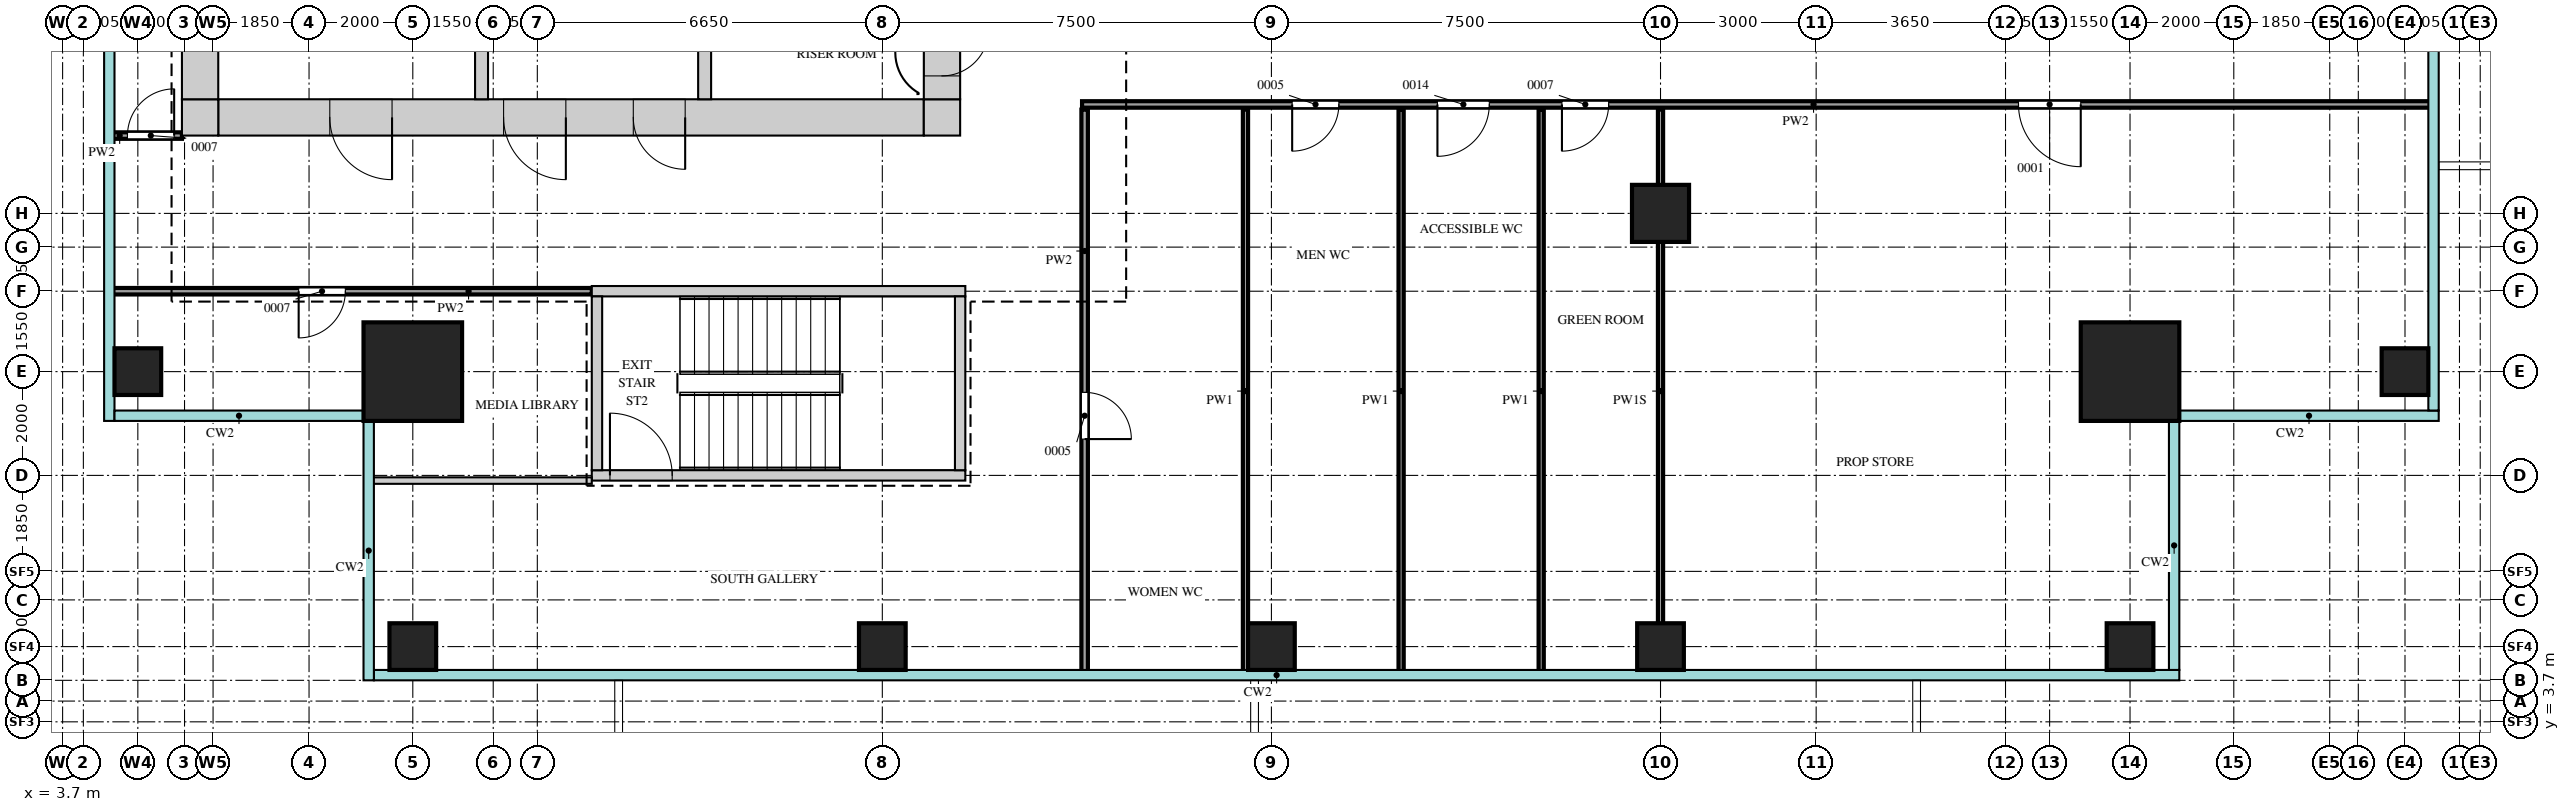
"""IFC4 building model, lengths in metres.
Left out: names, types, materials, properties, quantities, classifications, styles, units other than length and angle.
Written with IfcOpenShell. Run it as: python <this file> out.ifc"""

import sys

from ifc_helpers import new_model, si_unit, direction, frame, frame_2d, origin, origin_2d, place, context, subcontext, project, spatial, rectangle, extrude, source, transform, mapped, element, fill, save


model = new_model("IFC4")
c1 = context("Model", 3, precision=1e-05, world=origin(), true_north=direction((0.0, 1.0)))
c2 = subcontext(c1, "Body", "Model", "MODEL_VIEW")
j1 = project(units=[si_unit("LENGTHUNIT", "METRE"), si_unit("PLANEANGLEUNIT", "RADIAN")], contexts=[c1])
p1 = place(None, origin())
s1 = spatial("IfcSite", under=j1, at=p1, CompositionType="ELEMENT")
p2 = place(p1, origin())
s2 = spatial("IfcBuilding", under=s1, at=p2, CompositionType="ELEMENT")
p3 = place(p2, frame((0.0, 0.0, 250.2)))
s3 = spatial("IfcBuildingStorey", under=s2, at=p3, CompositionType="ELEMENT", Elevation=250.2)
m1 = source(origin(), c2, "Body", "SweptSolid", [
    extrude(rectangle(XDim=13.6, YDim=0.7, at=frame_2d((6.8, 0.0))), origin(), (0.0, 0.0, 1.0), 3.75),
])
p4 = place(p3, frame((6.7, 15.35, 0.0), z_axis=(0.0, 0.0, 1.0), x_axis=(1.0, 0.0, 0.0)))
e1 = element("IfcWall", 1, at=p4, inside=s3, PredefinedType="SHEAR", context=c2, shape_type="MappedRepresentation", body=[
    mapped(m1, transform((0.0, 0.0, 0.0))),
])
m2 = source(origin(), c2, "Body", "SweptSolid", [
    extrude(rectangle(XDim=1.2, YDim=2.1, at=frame_2d((0.6, 1.05))), frame((0.0, 0.36, 0.0), z_axis=(0.0, -1.0, 0.0), x_axis=(1.0, 0.0, 0.0)), (0.0, 0.0, 1.0), 0.72),
])
p5 = place(p4, frame((5.5, 0.0, 0.0)))
e2 = element("IfcOpeningElement", 2, at=p5, cuts=e1, PredefinedType="OPENING", context=c2, shape_type="MappedRepresentation", body=[
    mapped(m2, transform((0.0, 0.0, 0.0))),
])
p6 = place(p4, frame((2.15, 0.0, 0.0)))
e3 = element("IfcOpeningElement", 3, at=p6, cuts=e1, PredefinedType="OPENING", context=c2, shape_type="MappedRepresentation", body=[
    mapped(m2, transform((0.0, 0.0, 0.0))),
])
m3 = source(origin(), c2, "Body", "SweptSolid", [
    extrude(rectangle(XDim=1.0, YDim=2.1, at=frame_2d((0.5, 1.05))), frame((0.0, 0.36, 0.0), z_axis=(0.0, -1.0, 0.0), x_axis=(1.0, 0.0, 0.0)), (0.0, 0.0, 1.0), 0.72),
])
p7 = place(p4, frame((8.0, 0.0, 0.0)))
e4 = element("IfcOpeningElement", 4, at=p7, cuts=e1, PredefinedType="OPENING", context=c2, shape_type="MappedRepresentation", body=[
    mapped(m3, transform((0.0, 0.0, 0.0))),
])
m4 = source(origin(), c2, "Body", "SweptSolid", [
    extrude(rectangle(XDim=0.7, YDim=0.7, at=frame_2d((0.35, 0.0))), origin(), (0.0, 0.0, 1.0), 3.75),
])
for number, where, z_axis, x_axis in (
    (5, (20.3, 15.35, 0.0), (0.0, 0.0, 1.0), (1.0, 0.0, 0.0)),
    (6, (6.0, 15.35, 0.0), (0.0, 0.0, 1.0), (1.0, 0.0, 0.0)),
):
    element("IfcWall", number, at=place(p3, frame(where, z_axis=z_axis, x_axis=x_axis)), inside=s3, PredefinedType="SHEAR", context=c2, shape_type="MappedRepresentation", body=[
        mapped(m4, transform((0.0, 0.0, 0.0))),
    ])
m5 = source(origin(), c2, "Body", "SweptSolid", [
    extrude(rectangle(XDim=22.6, YDim=0.7, at=frame_2d((11.3, 0.0))), origin(), (0.0, 0.0, 1.0), 3.75),
])
p8 = place(p3, frame((20.65, 15.7, 0.0), z_axis=(0.0, 0.0, 1.0), x_axis=(0.0, 1.0, 0.0)))
e7 = element("IfcWall", 7, at=p8, inside=s3, PredefinedType="SHEAR", context=c2, shape_type="MappedRepresentation", body=[
    mapped(m5, transform((0.0, 0.0, 0.0))),
])
m6 = source(origin(), c2, "Body", "SweptSolid", [
    extrude(rectangle(XDim=1.8, YDim=2.1, at=frame_2d((0.9, 1.05))), frame((0.0, 0.36, 0.0), z_axis=(0.0, -1.0, 0.0), x_axis=(1.0, 0.0, 0.0)), (0.0, 0.0, 1.0), 0.72),
])
p9 = place(p8, frame((10.8, 0.0, 0.0)))
e8 = element("IfcOpeningElement", 8, at=p9, cuts=e7, PredefinedType="OPENING", context=c2, shape_type="MappedRepresentation", body=[
    mapped(m6, transform((0.0, 0.0, 0.0))),
])
m7 = source(origin(), c2, "Body", "SweptSolid", [
    extrude(rectangle(XDim=0.9, YDim=2.1, at=frame_2d((0.45, 1.05))), frame((0.0, 0.36, 0.0), z_axis=(0.0, -1.0, 0.0), x_axis=(1.0, 0.0, 0.0)), (0.0, 0.0, 1.0), 0.72),
])
p10 = place(p8, frame((0.45, 0.0, 0.0)))
e9 = element("IfcOpeningElement", 9, at=p10, cuts=e7, PredefinedType="OPENING", context=c2, shape_type="MappedRepresentation", body=[
    mapped(m7, transform((0.0, 0.0, 0.0))),
])
p11 = place(p8, frame((2.9, 0.0, 0.0)))
e10 = element("IfcOpeningElement", 10, at=p11, cuts=e7, PredefinedType="OPENING", context=c2, shape_type="MappedRepresentation", body=[
    mapped(m7, transform((0.0, 0.0, 0.0))),
])
p12 = place(p8, frame((5.65, 0.0, 0.0)))
e11 = element("IfcOpeningElement", 11, at=p12, cuts=e7, PredefinedType="OPENING", context=c2, shape_type="MappedRepresentation", body=[
    mapped(m7, transform((0.0, 0.0, 0.0))),
])
p13 = place(p3, frame((6.35, 15.7, 0.0), z_axis=(0.0, 0.0, 1.0), x_axis=(0.0, 1.0, 0.0)))
e12 = element("IfcWall", 12, at=p13, inside=s3, PredefinedType="SHEAR", context=c2, shape_type="MappedRepresentation", body=[
    mapped(m5, transform((0.0, 0.0, 0.0))),
])
m8 = source(origin(), c2, "Body", "SweptSolid", [
    extrude(rectangle(XDim=7.2, YDim=0.2, at=frame_2d((3.6, 0.0))), origin(), (0.0, 0.0, 1.0), 3.75),
])
p14 = place(p3, frame((13.9, 12.0, 0.0), z_axis=(0.0, 0.0, 1.0), x_axis=(1.0, 0.0, 0.0)))
e13 = element("IfcWall", 13, at=p14, inside=s3, PredefinedType="SHEAR", context=c2, shape_type="MappedRepresentation", body=[
    mapped(m8, transform((0.0, 0.0, 0.0))),
])
p15 = place(p3, frame((13.9, 8.45, 0.0), z_axis=(0.0, 0.0, 1.0), x_axis=(1.0, 0.0, 0.0)))
e14 = element("IfcWall", 14, at=p15, inside=s3, PredefinedType="SHEAR", context=c2, shape_type="MappedRepresentation", body=[
    mapped(m8, transform((0.0, 0.0, 0.0))),
])
m9 = source(origin(), c2, "Body", "SweptSolid", [
    extrude(rectangle(XDim=1.2, YDim=2.1, at=frame_2d((0.6, 1.05))), frame((0.0, 0.11, 0.0), z_axis=(0.0, -1.0, 0.0), x_axis=(1.0, 0.0, 0.0)), (0.0, 0.0, 1.0), 0.22),
])
p16 = place(p15, frame((0.35, 0.0, 0.0)))
e15 = element("IfcOpeningElement", 15, at=p16, cuts=e14, PredefinedType="OPENING", context=c2, shape_type="MappedRepresentation", body=[
    mapped(m9, transform((0.0, 0.0, 0.0))),
])
m10 = source(origin(), c2, "Body", "SweptSolid", [
    extrude(rectangle(XDim=3.35, YDim=0.2, at=frame_2d((1.675, 0.0))), origin(), (0.0, 0.0, 1.0), 3.75),
])
for number, where, z_axis, x_axis in (
    (16, (21.0, 8.55, 0.0), (0.0, 0.0, 1.0), (0.0, 1.0, 0.0)),
    (17, (14.0, 8.55, 0.0), (0.0, 0.0, 1.0), (0.0, 1.0, 0.0)),
):
    element("IfcWall", number, at=place(p3, frame(where, z_axis=z_axis, x_axis=x_axis)), inside=s3, PredefinedType="SHEAR", context=c2, shape_type="MappedRepresentation", body=[
        mapped(m10, transform((0.0, 0.0, 0.0))),
    ])
m11 = source(origin(), c2, "Body", "SweptSolid", [
    extrude(rectangle(XDim=3.5, YDim=0.25, at=frame_2d((1.75, 0.0))), origin(), (0.0, 0.0, 1.0), 3.75),
])
for number, where, z_axis, x_axis in (
    (18, (16.075, 15.7, 0.0), (0.0, 0.0, 1.0), (0.0, 1.0, 0.0)),
    (19, (11.775, 15.7, 0.0), (0.0, 0.0, 1.0), (0.0, 1.0, 0.0)),
):
    element("IfcWall", number, at=place(p3, frame(where, z_axis=z_axis, x_axis=x_axis)), inside=s3, PredefinedType="STANDARD", context=c2, shape_type="MappedRepresentation", body=[
        mapped(m11, transform((0.0, 0.0, 0.0))),
    ])
m12 = source(origin(), c2, "Body", "SweptSolid", [
    extrude(rectangle(XDim=1.9, YDim=1.9, at=origin_2d()), origin(), (0.0, 0.0, 1.0), 4.0),
])
for number, where, z_axis, x_axis in (
    (20, (43.55, 10.45, 0.0), (0.0, 0.0, 1.0), (1.0, 0.0, 0.0)),
    (21, (10.45, 10.45, 0.0), (0.0, 0.0, 1.0), (1.0, 0.0, 0.0)),
):
    element("IfcColumn", number, at=place(p3, frame(where, z_axis=z_axis, x_axis=x_axis)), inside=s3, PredefinedType="COLUMN", context=c2, shape_type="MappedRepresentation", body=[
        mapped(m12, transform((0.0, 0.0, 0.0))),
    ])
m13 = source(origin(), c2, "Body", "SweptSolid", [
    extrude(rectangle(XDim=0.9, YDim=0.9, at=origin_2d()), origin(), (0.0, 0.0, 1.0), 3.75),
])
for number, where, z_axis, x_axis in (
    (22, (10.45, 5.15, 0.0), (0.0, 0.0, 1.0), (1.0, 0.0, 0.0)),
    (23, (19.5, 5.15, 0.0), (0.0, 0.0, 1.0), (1.0, 0.0, 0.0)),
    (24, (27.0, 5.15, 0.0), (0.0, 0.0, 1.0), (1.0, 0.0, 0.0)),
    (25, (34.5, 5.15, 0.0), (0.0, 0.0, 1.0), (1.0, 0.0, 0.0)),
    (26, (43.55, 5.15, 0.0), (0.0, 0.0, 1.0), (1.0, 0.0, 0.0)),
    (27, (48.85, 10.45, 0.0), (0.0, 0.0, 1.0), (1.0, 0.0, 0.0)),
    (28, (5.15, 10.45, 0.0), (0.0, 0.0, 1.0), (1.0, 0.0, 0.0)),
):
    element("IfcColumn", number, at=place(p3, frame(where, z_axis=z_axis, x_axis=x_axis)), inside=s3, PredefinedType="COLUMN", context=c2, shape_type="MappedRepresentation", body=[
        mapped(m13, transform((0.0, 0.0, 0.0))),
    ])
m14 = source(origin(), c2, "Body", "SweptSolid", [
    extrude(rectangle(XDim=1.1, YDim=1.1, at=origin_2d()), origin(), (0.0, 0.0, 1.0), 3.75),
])
p17 = place(p3, frame((34.5, 13.5, 0.0), z_axis=(0.0, 0.0, 1.0), x_axis=(1.0, 0.0, 0.0)))
e29 = element("IfcColumn", 29, at=p17, inside=s3, PredefinedType="COLUMN", context=c2, shape_type="MappedRepresentation", body=[
    mapped(m14, transform((0.0, 0.0, 0.0))),
])
m15 = source(origin(), c2, "Body", "SweptSolid", [
    extrude(rectangle(XDim=10.85, YDim=0.125, at=frame_2d((5.425, 0.0))), origin(), (0.0, 0.0, 1.0), 3.8),
])
p18 = place(p3, frame((23.4, 4.65, 0.0), z_axis=(0.0, 0.0, 1.0), x_axis=(0.0, 1.0, 0.0)))
e30 = element("IfcWall", 30, at=p18, inside=s3, PredefinedType="PARTITIONING", context=c2, shape_type="MappedRepresentation", body=[
    mapped(m15, transform((0.0, 0.0, 0.0))),
])
m16 = source(origin(), c2, "Body", "SweptSolid", [
    extrude(rectangle(XDim=0.9, YDim=2.1, at=frame_2d((0.45, 1.05))), frame((0.0, 0.073, 0.0), z_axis=(0.0, -1.0, 0.0), x_axis=(1.0, 0.0, 0.0)), (0.0, 0.0, 1.0), 0.145),
])
p19 = place(p18, frame((4.5, 0.0, 0.0)))
e31 = element("IfcOpeningElement", 31, at=p19, cuts=e30, PredefinedType="OPENING", context=c2, shape_type="MappedRepresentation", body=[
    mapped(m16, transform((0.0, 0.0, 0.0))),
])
m17 = source(origin(), c2, "Body", "SweptSolid", [
    extrude(rectangle(XDim=10.85, YDim=0.1, at=frame_2d((5.425, 0.0))), origin(), (0.0, 0.0, 1.0), 3.8),
])
for number, where, z_axis, x_axis in (
    (32, (26.5, 4.65, 0.0), (0.0, 0.0, 1.0), (0.0, 1.0, 0.0)),
    (33, (29.5, 4.65, 0.0), (0.0, 0.0, 1.0), (0.0, 1.0, 0.0)),
    (34, (32.2, 4.65, 0.0), (0.0, 0.0, 1.0), (0.0, 1.0, 0.0)),
):
    element("IfcWall", number, at=place(p3, frame(where, z_axis=z_axis, x_axis=x_axis)), inside=s3, PredefinedType="PARTITIONING", context=c2, shape_type="MappedRepresentation", body=[
        mapped(m17, transform((0.0, 0.0, 0.0))),
    ])
m18 = source(origin(), c2, "Body", "SweptSolid", [
    extrude(rectangle(XDim=10.85, YDim=0.1, at=frame_2d((5.425, 0.0))), origin(), (0.0, 0.0, 1.0), 3.35),
])
p20 = place(p3, frame((34.5, 4.65, 0.0), z_axis=(0.0, 0.0, 1.0), x_axis=(0.0, 1.0, 0.0)))
e35 = element("IfcWall", 35, at=p20, inside=s3, PredefinedType="PARTITIONING", context=c2, shape_type="MappedRepresentation", body=[
    mapped(m18, transform((0.0, 0.0, 0.0))),
])
m19 = source(origin(), c2, "Body", "SweptSolid", [
    extrude(rectangle(XDim=4.25, YDim=0.125, at=frame_2d((2.125, 0.0))), origin(), (0.0, 0.0, 1.0), 3.8),
])
p21 = place(p3, frame((9.65, 8.35, 0.0), z_axis=(0.0, 0.0, 1.0), x_axis=(1.0, 0.0, 0.0)))
e36 = element("IfcWall", 36, at=p21, inside=s3, PredefinedType="PARTITIONING", context=c2, shape_type="MappedRepresentation", body=[
    mapped(m19, transform((0.0, 0.0, 0.0))),
])
m20 = source(origin(), c2, "Body", "SweptSolid", [
    extrude(rectangle(XDim=9.25, YDim=0.125, at=frame_2d((4.625, 0.0))), origin(), (0.0, 0.0, 1.0), 3.8),
])
p22 = place(p3, frame((4.65, 12.0, 0.0), z_axis=(0.0, 0.0, 1.0), x_axis=(1.0, 0.0, 0.0)))
e37 = element("IfcWall", 37, at=p22, inside=s3, PredefinedType="PARTITIONING", context=c2, shape_type="MappedRepresentation", body=[
    mapped(m20, transform((0.0, 0.0, 0.0))),
])
p23 = place(p22, frame((3.6, 0.0, 0.0)))
e38 = element("IfcOpeningElement", 38, at=p23, cuts=e37, PredefinedType="OPENING", context=c2, shape_type="MappedRepresentation", body=[
    mapped(m16, transform((0.0, 0.0, 0.0))),
])
m21 = source(origin(), c2, "Body", "SweptSolid", [
    extrude(rectangle(XDim=1.35, YDim=0.125, at=frame_2d((0.675, 0.0))), origin(), (0.0, 0.0, 1.0), 3.8),
])
p24 = place(p3, frame((4.65, 15.0, 0.0), z_axis=(0.0, 0.0, 1.0), x_axis=(1.0, 0.0, 0.0)))
e39 = element("IfcWall", 39, at=p24, inside=s3, PredefinedType="PARTITIONING", context=c2, shape_type="MappedRepresentation", body=[
    mapped(m21, transform((0.0, 0.0, 0.0))),
])
p25 = place(p24, frame((0.3, 0.0, 0.0)))
e40 = element("IfcOpeningElement", 40, at=p25, cuts=e39, PredefinedType="OPENING", context=c2, shape_type="MappedRepresentation", body=[
    mapped(m16, transform((0.0, 0.0, 0.0))),
])
m22 = source(origin(), c2, "Body", "SweptSolid", [
    extrude(rectangle(XDim=26.0, YDim=0.125, at=frame_2d((13.0, 0.0))), origin(), (0.0, 0.0, 1.0), 3.8),
])
p26 = place(p3, frame((23.35, 15.6, 0.0), z_axis=(0.0, 0.0, 1.0), x_axis=(1.0, 0.0, 0.0)))
e41 = element("IfcWall", 41, at=p26, inside=s3, PredefinedType="PARTITIONING", context=c2, shape_type="MappedRepresentation", body=[
    mapped(m22, transform((0.0, 0.0, 0.0))),
])
p27 = place(p26, frame((4.05, 0.0, 0.0)))
e42 = element("IfcOpeningElement", 42, at=p27, cuts=e41, PredefinedType="OPENING", context=c2, shape_type="MappedRepresentation", body=[
    mapped(m16, transform((0.0, 0.0, 0.0))),
])
m23 = source(origin(), c2, "Body", "SweptSolid", [
    extrude(rectangle(XDim=1.0, YDim=2.1, at=frame_2d((0.5, 1.05))), frame((0.0, 0.073, 0.0), z_axis=(0.0, -1.0, 0.0), x_axis=(1.0, 0.0, 0.0)), (0.0, 0.0, 1.0), 0.145),
])
p28 = place(p26, frame((6.85, 0.0, 0.0)))
e43 = element("IfcOpeningElement", 43, at=p28, cuts=e41, PredefinedType="OPENING", context=c2, shape_type="MappedRepresentation", body=[
    mapped(m23, transform((0.0, 0.0, 0.0))),
])
p29 = place(p26, frame((9.25, 0.0, 0.0)))
e44 = element("IfcOpeningElement", 44, at=p29, cuts=e41, PredefinedType="OPENING", context=c2, shape_type="MappedRepresentation", body=[
    mapped(m16, transform((0.0, 0.0, 0.0))),
])
m24 = source(origin(), c2, "Body", "SweptSolid", [
    extrude(rectangle(XDim=1.2, YDim=2.1, at=frame_2d((0.6, 1.05))), frame((0.0, 0.073, 0.0), z_axis=(0.0, -1.0, 0.0), x_axis=(1.0, 0.0, 0.0)), (0.0, 0.0, 1.0), 0.145),
])
p30 = place(p26, frame((18.05, 0.0, 0.0)))
e45 = element("IfcOpeningElement", 45, at=p30, cuts=e41, PredefinedType="OPENING", context=c2, shape_type="MappedRepresentation", body=[
    mapped(m24, transform((0.0, 0.0, 0.0))),
])
m25 = source(origin(), c2, "Body", "SweptSolid", [
    extrude(rectangle(XDim=0.9, YDim=2.1, at=frame_2d((0.45, 1.05))), frame((0.0, 0.3, 0.0), z_axis=(0.0, -1.0, 0.0), x_axis=(1.0, 0.0, 0.0)), (0.0, 0.0, 1.0), 0.6),
])
p31 = place(p10, origin())
e46 = element("IfcDoor", 46, at=p31, inside=s3, OperationType="SINGLE_SWING_RIGHT", PredefinedType="DOOR", context=c2, shape_type="MappedRepresentation", body=[
    mapped(m25, transform((0.0, 0.0, 0.0))),
])
fill(e9, e46)
m26 = source(origin(), c2, "Body", "SweptSolid", [
    extrude(rectangle(XDim=1.2, YDim=2.1, at=frame_2d((0.6, 1.05))), frame((0.0, 0.3, 0.0), z_axis=(0.0, -1.0, 0.0), x_axis=(1.0, 0.0, 0.0)), (0.0, 0.0, 1.0), 0.6),
])
p32 = place(p5, origin())
e47 = element("IfcDoor", 47, at=p32, inside=s3, OperationType="SINGLE_SWING_RIGHT", PredefinedType="DOOR", context=c2, shape_type="MappedRepresentation", body=[
    mapped(m26, transform((0.0, 0.0, 0.0))),
])
fill(e2, e47)
p33 = place(p6, origin())
e48 = element("IfcDoor", 48, at=p33, inside=s3, OperationType="SINGLE_SWING_RIGHT", PredefinedType="DOOR", context=c2, shape_type="MappedRepresentation", body=[
    mapped(m26, transform((0.0, 0.0, 0.0))),
])
fill(e3, e48)
m27 = source(origin(), c2, "Body", "SweptSolid", [
    extrude(rectangle(XDim=1.0, YDim=2.1, at=frame_2d((0.5, 1.05))), frame((0.0, 0.3, 0.0), z_axis=(0.0, -1.0, 0.0), x_axis=(1.0, 0.0, 0.0)), (0.0, 0.0, 1.0), 0.6),
])
p34 = place(p7, origin())
e49 = element("IfcDoor", 49, at=p34, inside=s3, OperationType="SINGLE_SWING_RIGHT", PredefinedType="DOOR", context=c2, shape_type="MappedRepresentation", body=[
    mapped(m27, transform((0.0, 0.0, 0.0))),
])
fill(e4, e49)
m28 = source(origin(), c2, "Body", "SweptSolid", [
    extrude(rectangle(XDim=0.9, YDim=2.1, at=frame_2d((0.45, 1.05))), frame((0.0, 0.025, 0.0), z_axis=(0.0, -1.0, 0.0), x_axis=(1.0, 0.0, 0.0)), (0.0, 0.0, 1.0), 0.05),
])
p35 = place(p25, origin())
e50 = element("IfcDoor", 50, at=p35, inside=s3, OperationType="SINGLE_SWING_LEFT", PredefinedType="DOOR", context=c2, shape_type="MappedRepresentation", body=[
    mapped(m28, transform((0.0, 0.0, 0.0))),
])
fill(e40, e50)
p36 = place(p23, origin())
e51 = element("IfcDoor", 51, at=p36, inside=s3, OperationType="SINGLE_SWING_LEFT", PredefinedType="DOOR", context=c2, shape_type="MappedRepresentation", body=[
    mapped(m28, transform((0.0, 0.0, 0.0))),
])
fill(e38, e51)
p37 = place(p19, origin())
e52 = element("IfcDoor", 52, at=p37, inside=s3, OperationType="SINGLE_SWING_LEFT", PredefinedType="DOOR", context=c2, shape_type="MappedRepresentation", body=[
    mapped(m28, transform((0.0, 0.0, 0.0))),
])
fill(e31, e52)
p38 = place(p27, origin())
e53 = element("IfcDoor", 53, at=p38, inside=s3, OperationType="SINGLE_SWING_LEFT", PredefinedType="DOOR", context=c2, shape_type="MappedRepresentation", body=[
    mapped(m28, transform((0.0, 0.0, 0.0))),
])
fill(e42, e53)
m29 = source(origin(), c2, "Body", "SweptSolid", [
    extrude(rectangle(XDim=1.0, YDim=2.1, at=frame_2d((0.5, 1.05))), frame((0.0, 0.025, 0.0), z_axis=(0.0, -1.0, 0.0), x_axis=(1.0, 0.0, 0.0)), (0.0, 0.0, 1.0), 0.05),
])
p39 = place(p28, origin())
e54 = element("IfcDoor", 54, at=p39, inside=s3, OperationType="SINGLE_SWING_LEFT", PredefinedType="DOOR", context=c2, shape_type="MappedRepresentation", body=[
    mapped(m29, transform((0.0, 0.0, 0.0))),
])
fill(e43, e54)
p40 = place(p29, origin())
e55 = element("IfcDoor", 55, at=p40, inside=s3, OperationType="SINGLE_SWING_LEFT", PredefinedType="DOOR", context=c2, shape_type="MappedRepresentation", body=[
    mapped(m28, transform((0.0, 0.0, 0.0))),
])
fill(e44, e55)
m30 = source(origin(), c2, "Body", "SweptSolid", [
    extrude(rectangle(XDim=1.2, YDim=2.1, at=frame_2d((0.6, 1.05))), frame((0.0, 0.025, 0.0), z_axis=(0.0, -1.0, 0.0), x_axis=(1.0, 0.0, 0.0)), (0.0, 0.0, 1.0), 0.05),
])
p41 = place(p30, origin())
e56 = element("IfcDoor", 56, at=p41, inside=s3, OperationType="SINGLE_SWING_RIGHT", PredefinedType="DOOR", context=c2, shape_type="MappedRepresentation", body=[
    mapped(m30, transform((0.0, 0.0, 0.0))),
])
fill(e45, e56)
p42 = place(p16, origin())
e57 = element("IfcDoor", 57, at=p42, inside=s3, OperationType="SINGLE_SWING_RIGHT", PredefinedType="DOOR", context=c2, shape_type="MappedRepresentation", body=[
    mapped(m30, transform((0.0, 0.0, 0.0))),
])
fill(e15, e57)
save(model, sys.argv[1])
